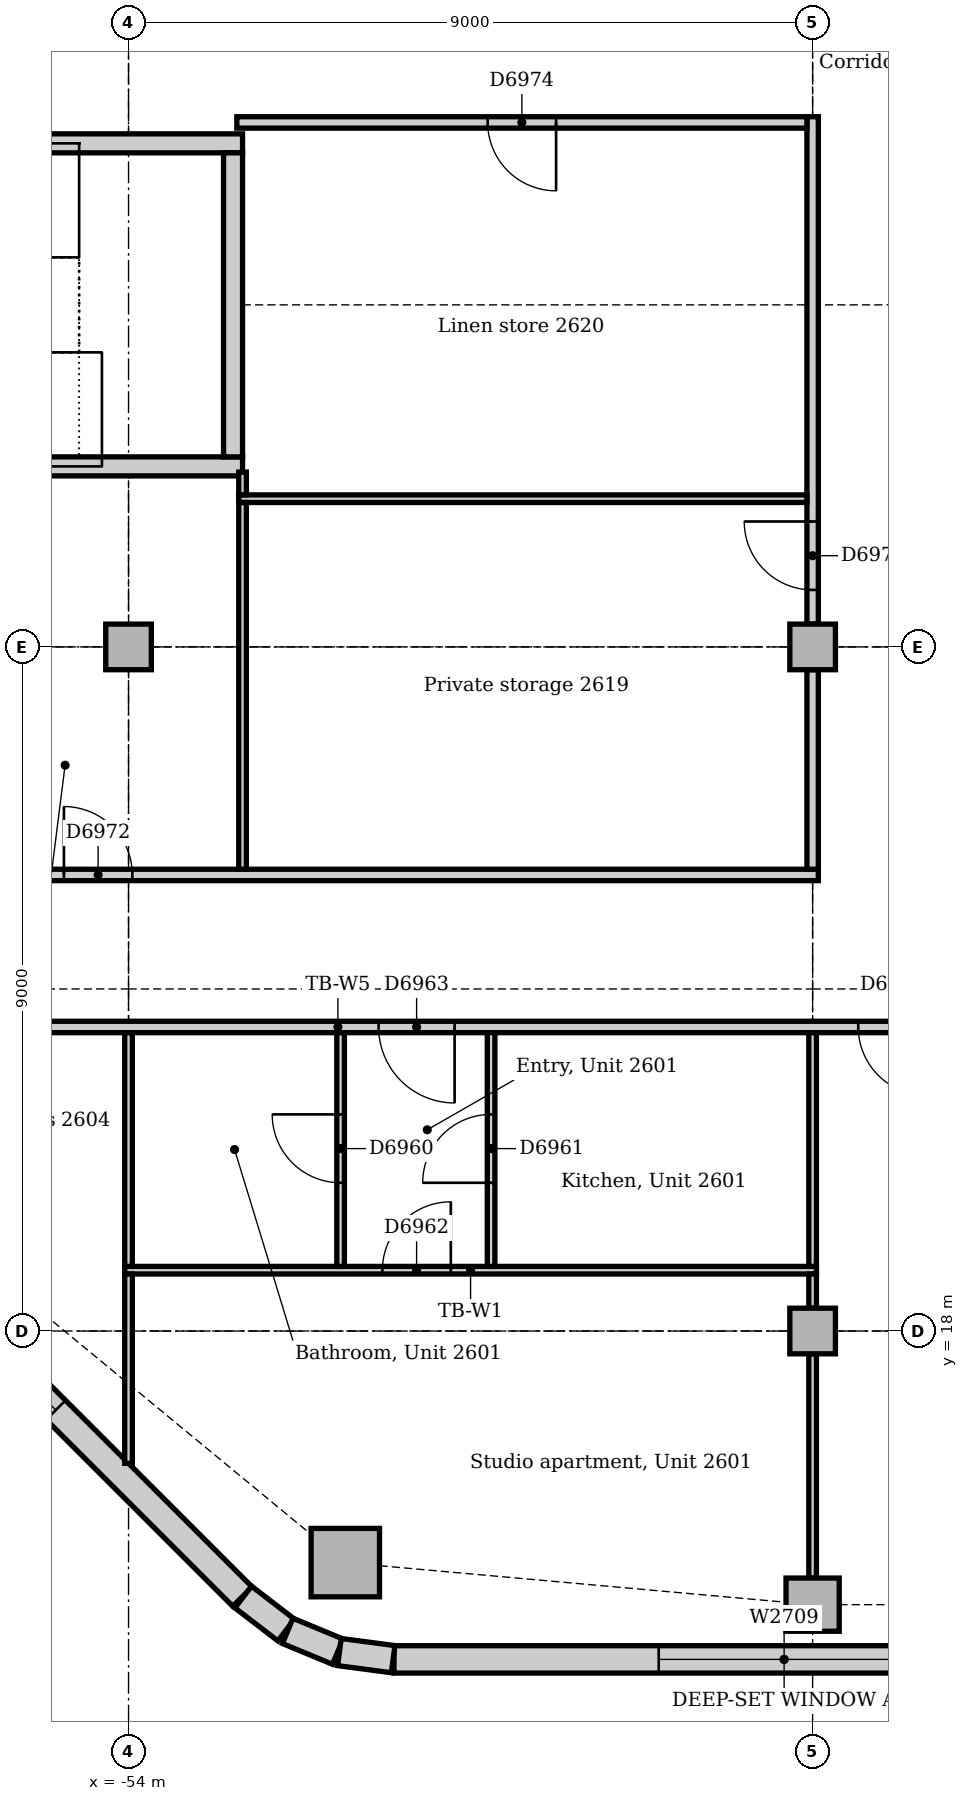
"""IFC4 building model, lengths in metres.
Left out: names, types, materials, properties, quantities, classifications, styles, units other than length and angle.
Written with IfcOpenShell. Run it as: python <this file> out.ifc"""

import sys

from ifc_helpers import new_model, si_unit, direction, frame, frame_2d, origin, origin_2d, place, context, subcontext, project, spatial, rectangle, extrude, element, fill, save


model = new_model("IFC4")
c1 = context("Model", 3, precision=1e-05, world=origin(), true_north=direction((0.0, 1.0)))
c2 = subcontext(c1, "Body", "Model", "MODEL_VIEW")
j1 = project(units=[si_unit("LENGTHUNIT", "METRE"), si_unit("PLANEANGLEUNIT", "RADIAN")], contexts=[c1])
p1 = place(None, origin())
s1 = spatial("IfcSite", under=j1, at=p1, CompositionType="ELEMENT")
p2 = place(p1, origin())
s2 = spatial("IfcBuilding", under=s1, at=p2, CompositionType="ELEMENT")
p3 = place(p2, frame((0.0, 0.0, 112.0)))
s3 = spatial("IfcBuildingStorey", under=s2, at=p3, CompositionType="ELEMENT", Elevation=112.0)
p4 = place(p3, frame((-60.0, 29.375, 0.0), z_axis=(0.0, 0.0, 1.0), x_axis=(1.0, 0.0, 0.0)))
e1 = element("IfcWall", 1, at=p4, inside=s3, PredefinedType="SOLIDWALL", context=c2, shape_type="SweptSolid", body=[
    extrude(rectangle(XDim=7.5, YDim=0.25, at=frame_2d((3.75, 0.0))), origin(), (0.0, 0.0, 1.0), 4.0),
])
p5 = place(p3, frame((-52.5, 33.625, 0.0), z_axis=(0.0, 0.0, 1.0), x_axis=(-1.0, 0.0, 0.0)))
e2 = element("IfcWall", 2, at=p5, inside=s3, PredefinedType="SOLIDWALL", context=c2, shape_type="SweptSolid", body=[
    extrude(rectangle(XDim=7.5, YDim=0.25, at=frame_2d((3.75, 0.0))), origin(), (0.0, 0.0, 1.0), 4.0),
])
p6 = place(p5, frame((6.0, 0.0, 0.0)))
e3 = element("IfcOpeningElement", 3, at=p6, cuts=e2, PredefinedType="OPENING", context=c2, shape_type="SweptSolid", body=[
    extrude(rectangle(XDim=1.0, YDim=2.1, at=frame_2d((0.5, 1.05))), frame((0.0, 0.135, 0.0), z_axis=(0.0, -1.0, 0.0), x_axis=(1.0, 0.0, 0.0)), (0.0, 0.0, 1.0), 0.27),
])
p7 = place(p3, frame((-52.625, 29.5, 0.0), z_axis=(0.0, 0.0, 1.0), x_axis=(0.0, 1.0, 0.0)))
e4 = element("IfcWall", 4, at=p7, inside=s3, PredefinedType="SOLIDWALL", context=c2, shape_type="SweptSolid", body=[
    extrude(rectangle(XDim=4.0, YDim=0.25, at=frame_2d((2.0, 0.0))), origin(), (0.0, 0.0, 1.0), 4.0),
])
p8 = place(p3, frame((-51.148, 14.953, 0.0), z_axis=(0.0, 0.0, 1.0), x_axis=(1.0, 0.0, 0.0)))
e5 = element("IfcColumn", 5, at=p8, inside=s3, PredefinedType="COLUMN", context=c2, shape_type="SweptSolid", body=[
    extrude(rectangle(XDim=0.9, YDim=0.9, at=origin_2d()), origin(), (0.0, 0.0, 1.0), 3.85),
])
p9 = place(p3, frame((-45.0, 14.4, 0.0), z_axis=(0.0, 0.0, 1.0), x_axis=(1.0, 0.0, 0.0)))
e6 = element("IfcColumn", 6, at=p9, inside=s3, PredefinedType="COLUMN", context=c2, shape_type="SweptSolid", body=[
    extrude(rectangle(XDim=0.7, YDim=0.7, at=origin_2d()), origin(), (0.0, 0.0, 1.0), 3.85),
])
for number, where, z_axis, x_axis in (
    (7, (-54.0, 27.0, 0.0), (0.0, 0.0, 1.0), (1.0, 0.0, 0.0)),
    (8, (-45.0, 18.0, 0.0), (0.0, 0.0, 1.0), (1.0, 0.0, 0.0)),
    (9, (-45.0, 27.0, 0.0), (0.0, 0.0, 1.0), (1.0, 0.0, 0.0)),
):
    element("IfcColumn", number, at=place(p3, frame(where, z_axis=z_axis, x_axis=x_axis)), inside=s3, PredefinedType="COLUMN", context=c2, shape_type="SweptSolid", body=[
        extrude(rectangle(XDim=0.6, YDim=0.6, at=origin_2d()), origin(), (0.0, 0.0, 1.0), 3.85),
    ])
p10 = place(p3, frame((-50.507, 13.68, 0.0), z_axis=(0.0, 0.0, 1.0), x_axis=(1.0, 0.0, 0.0)))
e10 = element("IfcWall", 10, at=p10, inside=s3, PredefinedType="STANDARD", context=c2, shape_type="SweptSolid", body=[
    extrude(rectangle(XDim=19.265, YDim=0.36, at=frame_2d((9.632, 0.0))), origin(), (0.0, 0.0, 1.0), 3.85),
])
p11 = place(p10, frame((3.482, 0.0, 0.9)))
e11 = element("IfcOpeningElement", 11, at=p11, cuts=e10, PredefinedType="OPENING", context=c2, shape_type="SweptSolid", body=[
    extrude(rectangle(XDim=3.3, YDim=1.6, at=frame_2d((1.65, 0.8))), frame((0.0, 0.19, 0.0), z_axis=(0.0, -1.0, 0.0), x_axis=(1.0, 0.0, 0.0)), (0.0, 0.0, 1.0), 0.38),
])
p12 = place(p10, frame((7.982, 0.0, 0.9)))
e12 = element("IfcOpeningElement", 12, at=p12, cuts=e10, PredefinedType="OPENING", context=c2, shape_type="SweptSolid", body=[
    extrude(rectangle(XDim=3.3, YDim=1.6, at=frame_2d((1.65, 0.8))), frame((0.0, 0.19, 0.0), z_axis=(0.0, -1.0, 0.0), x_axis=(1.0, 0.0, 0.0)), (0.0, 0.0, 1.0), 0.38),
])
p13 = place(p10, frame((12.482, 0.0, 0.9)))
e13 = element("IfcOpeningElement", 13, at=p13, cuts=e10, PredefinedType="OPENING", context=c2, shape_type="SweptSolid", body=[
    extrude(rectangle(XDim=3.3, YDim=1.6, at=frame_2d((1.65, 0.8))), frame((0.0, 0.19, 0.0), z_axis=(0.0, -1.0, 0.0), x_axis=(1.0, 0.0, 0.0)), (0.0, 0.0, 1.0), 0.38),
])
p14 = place(p3, frame((-59.744, 21.749, 0.0), z_axis=(0.0, 0.0, 1.0), x_axis=(0.707106781187, -0.707106781187, 0.0)))
e14 = element("IfcWall", 14, at=p14, inside=s3, PredefinedType="STANDARD", context=c2, shape_type="SweptSolid", body=[
    extrude(rectangle(XDim=10.243, YDim=0.36, at=frame_2d((5.121, 0.0))), origin(), (0.0, 0.0, 1.0), 3.85),
])
p15 = place(p14, frame((3.471, 0.0, 0.9)))
e15 = element("IfcOpeningElement", 15, at=p15, cuts=e14, PredefinedType="OPENING", context=c2, shape_type="SweptSolid", body=[
    extrude(rectangle(XDim=3.3, YDim=1.6, at=frame_2d((1.65, 0.8))), frame((0.0, 0.19, 0.0), z_axis=(0.0, -1.0, 0.0), x_axis=(1.0, 0.0, 0.0)), (0.0, 0.0, 1.0), 0.38),
])
p16 = place(p3, frame((-52.491, 14.5, 0.0), z_axis=(0.0, 0.0, 1.0), x_axis=(0.793321924995, -0.608802368033, 0.0)))
e16 = element("IfcWall", 16, at=p16, inside=s3, PredefinedType="STANDARD", context=c2, shape_type="SweptSolid", body=[
    extrude(rectangle(XDim=0.713, YDim=0.36, at=frame_2d((0.357, 0.0))), origin(), (0.0, 0.0, 1.0), 3.85),
])
for number, where, z_axis, x_axis in (
    (17, (-51.906, 14.055, 0.0), (0.0, 0.0, 1.0), (0.924, -0.383, 0.0)),
    (18, (-51.226, 13.776, 0.0), (0.0, 0.0, 1.0), (0.991, -0.131, 0.0)),
):
    element("IfcWall", number, at=place(p3, frame(where, z_axis=z_axis, x_axis=x_axis)), inside=s3, PredefinedType="STANDARD", context=c2, shape_type="SweptSolid", body=[
        extrude(rectangle(XDim=0.713, YDim=0.36, at=frame_2d((0.356, 0.0))), origin(), (0.0, 0.0, 1.0), 3.85),
    ])
p17 = place(p3, frame((-59.766, 22.0, 0.0), z_axis=(0.0, 0.0, 1.0), x_axis=(1.0, 0.0, 0.0)))
e19 = element("IfcWall", 19, at=p17, inside=s3, PredefinedType="PARTITIONING", context=c2, shape_type="SweptSolid", body=[
    extrude(rectangle(XDim=17.041, YDim=0.15, at=frame_2d((8.52, 0.0))), origin(), (0.0, 0.0, 1.0), 3.85),
])
p18 = place(p17, frame((15.366, 0.0, 0.0)))
e20 = element("IfcOpeningElement", 20, at=p18, cuts=e19, PredefinedType="OPENING", context=c2, shape_type="SweptSolid", body=[
    extrude(rectangle(XDim=0.9, YDim=2.1, at=frame_2d((0.45, 1.05))), frame((0.0, 0.085, 0.0), z_axis=(0.0, -1.0, 0.0), x_axis=(1.0, 0.0, 0.0)), (0.0, 0.0, 1.0), 0.17),
])
p19 = place(p17, frame((2.5, 0.0, 0.0)))
e21 = element("IfcOpeningElement", 21, at=p19, cuts=e19, PredefinedType="OPENING", context=c2, shape_type="SweptSolid", body=[
    extrude(rectangle(XDim=0.9, YDim=2.1, at=frame_2d((0.45, 1.05))), frame((0.0, 0.085, 0.0), z_axis=(0.0, -1.0, 0.0), x_axis=(1.0, 0.0, 0.0)), (0.0, 0.0, 1.0), 0.17),
])
p20 = place(p17, frame((9.056, 0.0, 0.0)))
e22 = element("IfcOpeningElement", 22, at=p20, cuts=e19, PredefinedType="OPENING", context=c2, shape_type="SweptSolid", body=[
    extrude(rectangle(XDim=1.0, YDim=2.1, at=frame_2d((0.5, 1.05))), frame((0.0, 0.085, 0.0), z_axis=(0.0, -1.0, 0.0), x_axis=(1.0, 0.0, 0.0)), (0.0, 0.0, 1.0), 0.17),
])
p21 = place(p3, frame((-60.075, 24.0, 0.0), z_axis=(0.0, 0.0, 1.0), x_axis=(1.0, 0.0, 0.0)))
e23 = element("IfcWall", 23, at=p21, inside=s3, PredefinedType="PARTITIONING", context=c2, shape_type="SweptSolid", body=[
    extrude(rectangle(XDim=15.15, YDim=0.15, at=frame_2d((7.575, 0.0))), origin(), (0.0, 0.0, 1.0), 3.85),
])
p22 = place(p21, frame((1.55, 0.0, 0.0)))
e24 = element("IfcOpeningElement", 24, at=p22, cuts=e23, PredefinedType="OPENING", context=c2, shape_type="SweptSolid", body=[
    extrude(rectangle(XDim=0.9, YDim=2.1, at=frame_2d((0.45, 1.05))), frame((0.0, 0.085, 0.0), z_axis=(0.0, -1.0, 0.0), x_axis=(1.0, 0.0, 0.0)), (0.0, 0.0, 1.0), 0.17),
])
p23 = place(p21, frame((5.225, 0.0, 0.0)))
e25 = element("IfcOpeningElement", 25, at=p23, cuts=e23, PredefinedType="OPENING", context=c2, shape_type="SweptSolid", body=[
    extrude(rectangle(XDim=0.9, YDim=2.1, at=frame_2d((0.45, 1.05))), frame((0.0, 0.085, 0.0), z_axis=(0.0, -1.0, 0.0), x_axis=(1.0, 0.0, 0.0)), (0.0, 0.0, 1.0), 0.17),
])
p24 = place(p3, frame((-45.0, 24.075, 0.0), z_axis=(0.0, 0.0, 1.0), x_axis=(0.0, 1.0, 0.0)))
e26 = element("IfcWall", 26, at=p24, inside=s3, PredefinedType="PARTITIONING", context=c2, shape_type="SweptSolid", body=[
    extrude(rectangle(XDim=2.625, YDim=0.15, at=frame_2d((1.312, 0.0))), origin(), (0.0, 0.0, 1.0), 3.362),
])
p25 = place(p3, frame((-45.0, 27.3, 0.0), z_axis=(0.0, 0.0, 1.0), x_axis=(0.0, 1.0, 0.0)))
e27 = element("IfcWall", 27, at=p25, inside=s3, PredefinedType="PARTITIONING", context=c2, shape_type="SweptSolid", body=[
    extrude(rectangle(XDim=6.675, YDim=0.15, at=frame_2d((3.337, 0.0))), origin(), (0.0, 0.0, 1.0), 3.362),
])
p26 = place(p25, frame((0.45, 0.0, 0.0)))
e28 = element("IfcOpeningElement", 28, at=p26, cuts=e27, PredefinedType="OPENING", context=c2, shape_type="SweptSolid", body=[
    extrude(rectangle(XDim=0.9, YDim=2.1, at=frame_2d((0.45, 1.05))), frame((0.0, 0.085, 0.0), z_axis=(0.0, -1.0, 0.0), x_axis=(1.0, 0.0, 0.0)), (0.0, 0.0, 1.0), 0.17),
])
p27 = place(p3, frame((-52.575, 33.9, 0.0), z_axis=(0.0, 0.0, 1.0), x_axis=(1.0, 0.0, 0.0)))
e29 = element("IfcWall", 29, at=p27, inside=s3, PredefinedType="PARTITIONING", context=c2, shape_type="SweptSolid", body=[
    extrude(rectangle(XDim=7.5, YDim=0.15, at=frame_2d((3.75, 0.0))), origin(), (0.0, 0.0, 1.0), 3.85),
])
p28 = place(p27, frame((3.3, 0.0, 0.0)))
e30 = element("IfcOpeningElement", 30, at=p28, cuts=e29, PredefinedType="OPENING", context=c2, shape_type="SweptSolid", body=[
    extrude(rectangle(XDim=0.9, YDim=2.1, at=frame_2d((0.45, 1.05))), frame((0.0, 0.085, 0.0), z_axis=(0.0, -1.0, 0.0), x_axis=(1.0, 0.0, 0.0)), (0.0, 0.0, 1.0), 0.17),
])
p29 = place(p3, frame((-54.05, 18.8, 0.0), z_axis=(0.0, 0.0, 1.0), x_axis=(1.0, 0.0, 0.0)))
e31 = element("IfcWall", 31, at=p29, inside=s3, PredefinedType="PARTITIONING", context=c2, shape_type="SweptSolid", body=[
    extrude(rectangle(XDim=9.1, YDim=0.1, at=frame_2d((4.55, 0.0))), origin(), (0.0, 0.0, 1.0), 3.85),
])
p30 = place(p29, frame((3.39, 0.0, 0.0)))
e32 = element("IfcOpeningElement", 32, at=p30, cuts=e31, PredefinedType="OPENING", context=c2, shape_type="SweptSolid", body=[
    extrude(rectangle(XDim=0.9, YDim=2.1, at=frame_2d((0.45, 1.05))), frame((0.0, 0.06, 0.0), z_axis=(0.0, -1.0, 0.0), x_axis=(1.0, 0.0, 0.0)), (0.0, 0.0, 1.0), 0.12),
])
p31 = place(p3, frame((-45.0, 18.85, 0.0), z_axis=(0.0, 0.0, 1.0), x_axis=(0.0, 1.0, 0.0)))
e33 = element("IfcWall", 33, at=p31, inside=s3, PredefinedType="PARTITIONING", context=c2, shape_type="SweptSolid", body=[
    extrude(rectangle(XDim=3.075, YDim=0.1, at=frame_2d((1.538, 0.0))), origin(), (0.0, 0.0, 1.0), 3.362),
])
p32 = place(p3, frame((-45.0, 18.3, 0.0), z_axis=(0.0, 0.0, 1.0), x_axis=(0.0, 1.0, 0.0)))
e34 = element("IfcWall", 34, at=p32, inside=s3, PredefinedType="PARTITIONING", context=c2, shape_type="SweptSolid", body=[
    extrude(rectangle(XDim=0.45, YDim=0.1, at=frame_2d((0.225, 0.0))), origin(), (0.0, 0.0, 1.0), 3.85),
])
p33 = place(p3, frame((-45.0, 14.75, 0.0), z_axis=(0.0, 0.0, 1.0), x_axis=(0.0, 1.0, 0.0)))
e35 = element("IfcWall", 35, at=p33, inside=s3, PredefinedType="PARTITIONING", context=c2, shape_type="SweptSolid", body=[
    extrude(rectangle(XDim=2.95, YDim=0.1, at=frame_2d((1.475, 0.0))), origin(), (0.0, 0.0, 1.0), 3.652),
])
p34 = place(p3, frame((-52.55, 28.95, 0.0), z_axis=(0.0, 0.0, 1.0), x_axis=(1.0, 0.0, 0.0)))
e36 = element("IfcWall", 36, at=p34, inside=s3, PredefinedType="PARTITIONING", context=c2, shape_type="SweptSolid", body=[
    extrude(rectangle(XDim=7.475, YDim=0.1, at=frame_2d((3.737, 0.0))), origin(), (0.0, 0.0, 1.0), 3.85),
])
p35 = place(p3, frame((-54.0, 18.85, 0.0), z_axis=(0.0, 0.0, 1.0), x_axis=(0.0, 1.0, 0.0)))
e37 = element("IfcWall", 37, at=p35, inside=s3, PredefinedType="PARTITIONING", context=c2, shape_type="SweptSolid", body=[
    extrude(rectangle(XDim=3.075, YDim=0.1, at=frame_2d((1.538, 0.0))), origin(), (0.0, 0.0, 1.0), 3.362),
])
p36 = place(p3, frame((-54.0, 16.259, 0.0), z_axis=(0.0, 0.0, 1.0), x_axis=(0.0, 1.0, 0.0)))
e38 = element("IfcWall", 38, at=p36, inside=s3, PredefinedType="PARTITIONING", context=c2, shape_type="SweptSolid", body=[
    extrude(rectangle(XDim=2.491, YDim=0.1, at=frame_2d((1.245, 0.0))), origin(), (0.0, 0.0, 1.0), 3.362),
])
p37 = place(p3, frame((-52.5, 29.0, 0.0), z_axis=(0.0, 0.0, 1.0), x_axis=(0.0, 1.0, 0.0)))
e39 = element("IfcWall", 39, at=p37, inside=s3, PredefinedType="PARTITIONING", context=c2, shape_type="SweptSolid", body=[
    extrude(rectangle(XDim=0.3, YDim=0.1, at=frame_2d((0.15, 0.0))), origin(), (0.0, 0.0, 1.0), 3.85),
])
p38 = place(p3, frame((-52.5, 24.075, 0.0), z_axis=(0.0, 0.0, 1.0), x_axis=(0.0, 1.0, 0.0)))
e40 = element("IfcWall", 40, at=p38, inside=s3, PredefinedType="PARTITIONING", context=c2, shape_type="SweptSolid", body=[
    extrude(rectangle(XDim=4.825, YDim=0.1, at=frame_2d((2.413, 0.0))), origin(), (0.0, 0.0, 1.0), 3.85),
])
p39 = place(p3, frame((-51.21, 18.85, 0.0), z_axis=(0.0, 0.0, 1.0), x_axis=(0.0, 1.0, 0.0)))
e41 = element("IfcWall", 41, at=p39, inside=s3, PredefinedType="PARTITIONING", context=c2, shape_type="SweptSolid", body=[
    extrude(rectangle(XDim=3.075, YDim=0.1, at=frame_2d((1.538, 0.0))), origin(), (0.0, 0.0, 1.0), 3.85),
])
p40 = place(p39, frame((1.1, 0.0, 0.0)))
e42 = element("IfcOpeningElement", 42, at=p40, cuts=e41, PredefinedType="OPENING", context=c2, shape_type="SweptSolid", body=[
    extrude(rectangle(XDim=0.9, YDim=2.1, at=frame_2d((0.45, 1.05))), frame((0.0, 0.06, 0.0), z_axis=(0.0, -1.0, 0.0), x_axis=(1.0, 0.0, 0.0)), (0.0, 0.0, 1.0), 0.12),
])
p41 = place(p3, frame((-49.23, 18.85, 0.0), z_axis=(0.0, 0.0, 1.0), x_axis=(0.0, 1.0, 0.0)))
e43 = element("IfcWall", 43, at=p41, inside=s3, PredefinedType="PARTITIONING", context=c2, shape_type="SweptSolid", body=[
    extrude(rectangle(XDim=3.075, YDim=0.1, at=frame_2d((1.538, 0.0))), origin(), (0.0, 0.0, 1.0), 3.85),
])
p42 = place(p41, frame((1.1, 0.0, 0.0)))
e44 = element("IfcOpeningElement", 44, at=p42, cuts=e43, PredefinedType="OPENING", context=c2, shape_type="SweptSolid", body=[
    extrude(rectangle(XDim=0.9, YDim=2.1, at=frame_2d((0.45, 1.05))), frame((0.0, 0.06, 0.0), z_axis=(0.0, -1.0, 0.0), x_axis=(1.0, 0.0, 0.0)), (0.0, 0.0, 1.0), 0.12),
])
p43 = place(p11, origin())
e45 = element("IfcWindow", 45, at=p43, inside=s3, PartitioningType="SINGLE_PANEL", PredefinedType="WINDOW", context=c2, shape_type="SweptSolid", body=[
    extrude(rectangle(XDim=3.3, YDim=1.6, at=frame_2d((1.65, 0.8))), frame((0.0, 0.13, 0.0), z_axis=(0.0, -1.0, 0.0), x_axis=(1.0, 0.0, 0.0)), (0.0, 0.0, 1.0), 0.06),
])
fill(e11, e45)
p44 = place(p15, origin())
e46 = element("IfcWindow", 46, at=p44, inside=s3, PartitioningType="SINGLE_PANEL", PredefinedType="WINDOW", context=c2, shape_type="SweptSolid", body=[
    extrude(rectangle(XDim=3.3, YDim=1.6, at=frame_2d((1.65, 0.8))), frame((0.0, 0.13, 0.0), z_axis=(0.0, -1.0, 0.0), x_axis=(1.0, 0.0, 0.0)), (0.0, 0.0, 1.0), 0.06),
])
fill(e15, e46)
p45 = place(p18, frame((0.9, 0.0, 0.0), z_axis=(0.0, 0.0, 1.0), x_axis=(-1.0, 0.0, 0.0)))
e47 = element("IfcDoor", 47, at=p45, inside=s3, OperationType="SINGLE_SWING_LEFT", PredefinedType="DOOR", context=c2, shape_type="SweptSolid", body=[
    extrude(rectangle(XDim=0.9, YDim=2.1, at=frame_2d((0.45, 1.05))), frame((0.0, 0.025, 0.0), z_axis=(0.0, -1.0, 0.0), x_axis=(1.0, 0.0, 0.0)), (0.0, 0.0, 1.0), 0.05),
])
fill(e20, e47)
p46 = place(p40, origin())
e48 = element("IfcDoor", 48, at=p46, inside=s3, OperationType="SINGLE_SWING_RIGHT", PredefinedType="DOOR", context=c2, shape_type="SweptSolid", body=[
    extrude(rectangle(XDim=0.9, YDim=2.1, at=frame_2d((0.45, 1.05))), frame((0.0, 0.025, 0.0), z_axis=(0.0, -1.0, 0.0), x_axis=(1.0, 0.0, 0.0)), (0.0, 0.0, 1.0), 0.05),
])
fill(e42, e48)
p47 = place(p42, origin())
e49 = element("IfcDoor", 49, at=p47, inside=s3, OperationType="SINGLE_SWING_LEFT", PredefinedType="DOOR", context=c2, shape_type="SweptSolid", body=[
    extrude(rectangle(XDim=0.9, YDim=2.1, at=frame_2d((0.45, 1.05))), frame((0.0, 0.025, 0.0), z_axis=(0.0, -1.0, 0.0), x_axis=(1.0, 0.0, 0.0)), (0.0, 0.0, 1.0), 0.05),
])
fill(e44, e49)
p48 = place(p30, origin())
e50 = element("IfcDoor", 50, at=p48, inside=s3, OperationType="SINGLE_SWING_RIGHT", PredefinedType="DOOR", context=c2, shape_type="SweptSolid", body=[
    extrude(rectangle(XDim=0.9, YDim=2.1, at=frame_2d((0.45, 1.05))), frame((0.0, 0.025, 0.0), z_axis=(0.0, -1.0, 0.0), x_axis=(1.0, 0.0, 0.0)), (0.0, 0.0, 1.0), 0.05),
])
fill(e32, e50)
p49 = place(p20, frame((1.0, 0.0, 0.0), z_axis=(0.0, 0.0, 1.0), x_axis=(-1.0, 0.0, 0.0)))
e51 = element("IfcDoor", 51, at=p49, inside=s3, OperationType="SINGLE_SWING_LEFT", PredefinedType="DOOR", context=c2, shape_type="SweptSolid", body=[
    extrude(rectangle(XDim=1.0, YDim=2.1, at=frame_2d((0.5, 1.05))), frame((0.0, 0.025, 0.0), z_axis=(0.0, -1.0, 0.0), x_axis=(1.0, 0.0, 0.0)), (0.0, 0.0, 1.0), 0.05),
])
fill(e22, e51)
p50 = place(p23, origin())
e52 = element("IfcDoor", 52, at=p50, inside=s3, OperationType="SINGLE_SWING_LEFT", PredefinedType="DOOR", context=c2, shape_type="SweptSolid", body=[
    extrude(rectangle(XDim=0.9, YDim=2.1, at=frame_2d((0.45, 1.05))), frame((0.0, 0.025, 0.0), z_axis=(0.0, -1.0, 0.0), x_axis=(1.0, 0.0, 0.0)), (0.0, 0.0, 1.0), 0.05),
])
fill(e25, e52)
p51 = place(p26, origin())
e53 = element("IfcDoor", 53, at=p51, inside=s3, OperationType="SINGLE_SWING_RIGHT", PredefinedType="DOOR", context=c2, shape_type="SweptSolid", body=[
    extrude(rectangle(XDim=0.9, YDim=2.1, at=frame_2d((0.45, 1.05))), frame((0.0, 0.025, 0.0), z_axis=(0.0, -1.0, 0.0), x_axis=(1.0, 0.0, 0.0)), (0.0, 0.0, 1.0), 0.05),
])
fill(e28, e53)
p52 = place(p28, frame((0.9, 0.0, 0.0), z_axis=(0.0, 0.0, 1.0), x_axis=(-1.0, 0.0, 0.0)))
e54 = element("IfcDoor", 54, at=p52, inside=s3, OperationType="SINGLE_SWING_LEFT", PredefinedType="DOOR", context=c2, shape_type="SweptSolid", body=[
    extrude(rectangle(XDim=0.9, YDim=2.1, at=frame_2d((0.45, 1.05))), frame((0.0, 0.025, 0.0), z_axis=(0.0, -1.0, 0.0), x_axis=(1.0, 0.0, 0.0)), (0.0, 0.0, 1.0), 0.05),
])
fill(e30, e54)
save(model, sys.argv[1])
